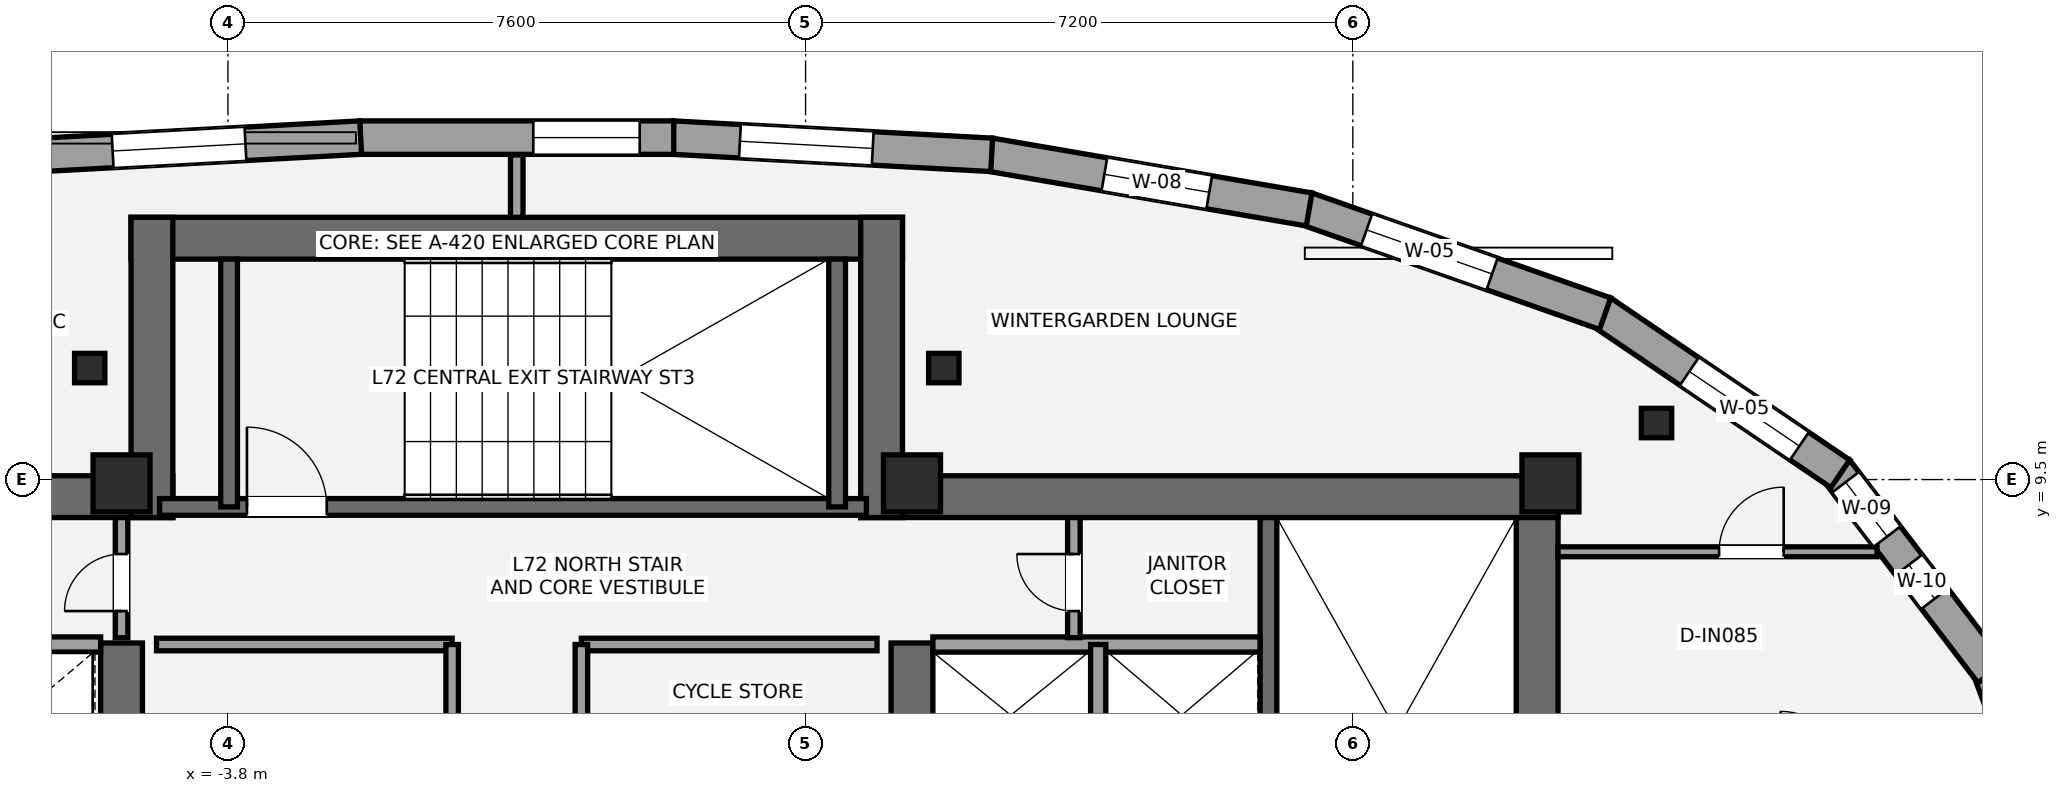
"""IFC4 building model, lengths in metres.
Left out: names, types, materials, properties, quantities, classifications, styles, units other than length and angle.
Written with IfcOpenShell. Run it as: python <this file> out.ifc"""

import sys

from ifc_helpers import new_model, si_unit, direction, frame, frame_2d, origin, origin_2d, place, context, subcontext, project, spatial, rectangle, i_section, extrude, element, fill, save


model = new_model("IFC4")
c1 = context("Model", 3, precision=1e-05, world=origin(), true_north=direction((0.0, 1.0)))
c2 = subcontext(c1, "Body", "Model", "MODEL_VIEW")
j1 = project(units=[si_unit("LENGTHUNIT", "METRE"), si_unit("PLANEANGLEUNIT", "RADIAN")], contexts=[c1])
p1 = place(None, origin())
s1 = spatial("IfcSite", under=j1, at=p1, CompositionType="ELEMENT")
p2 = place(p1, origin())
s2 = spatial("IfcBuilding", under=s1, at=p2, CompositionType="ELEMENT")
p3 = place(p2, frame((0.0, 0.0, 254.1)))
s3 = spatial("IfcBuildingStorey", under=s2, at=p3, CompositionType="ELEMENT", Elevation=254.1)
p4 = place(p3, frame((-13.7, 9.275, 0.0), z_axis=(0.0, 0.0, 1.0), x_axis=(1.0, 0.0, 0.0)))
e1 = element("IfcWall", 1, at=p4, inside=s3, PredefinedType="SHEAR", context=c2, shape_type="SweptSolid", body=[
    extrude(rectangle(XDim=9.175, YDim=0.55, at=frame_2d((4.587, 0.0))), origin(), (0.0, 0.0, 1.0), 3.15),
])
p5 = place(p3, frame((-5.2, 5.35, 0.0), z_axis=(0.0, 0.0, 1.0), x_axis=(0.0, 1.0, 0.0)))
e2 = element("IfcWall", 2, at=p5, inside=s3, PredefinedType="SHEAR", context=c2, shape_type="SweptSolid", body=[
    extrude(rectangle(XDim=2.0, YDim=0.55, at=frame_2d((1.0, 0.0))), origin(), (0.0, 0.0, 1.0), 3.15),
])
p6 = place(p3, frame((13.425, 1.3, 0.0), z_axis=(0.0, 0.0, 1.0), x_axis=(0.0, 1.0, 0.0)))
e3 = element("IfcWall", 3, at=p6, inside=s3, PredefinedType="SHEAR", context=c2, shape_type="SweptSolid", body=[
    extrude(rectangle(XDim=8.25, YDim=0.55, at=frame_2d((4.125, 0.0))), origin(), (0.0, 0.0, 1.0), 3.15),
])
p7 = place(p3, frame((4.525, 9.275, 0.0), z_axis=(0.0, 0.0, 1.0), x_axis=(1.0, 0.0, 0.0)))
e4 = element("IfcWall", 4, at=p7, inside=s3, PredefinedType="SHEAR", context=c2, shape_type="SweptSolid", body=[
    extrude(rectangle(XDim=9.175, YDim=0.55, at=frame_2d((4.587, 0.0))), origin(), (0.0, 0.0, 1.0), 3.15),
])
p8 = place(p3, frame((5.2, 5.35, 0.0), z_axis=(0.0, 0.0, 1.0), x_axis=(0.0, 1.0, 0.0)))
e5 = element("IfcWall", 5, at=p8, inside=s3, PredefinedType="SHEAR", context=c2, shape_type="SweptSolid", body=[
    extrude(rectangle(XDim=2.0, YDim=0.55, at=frame_2d((1.0, 0.0))), origin(), (0.0, 0.0, 1.0), 3.15),
])
p9 = place(p3, frame((9.89, 1.85, 0.0), z_axis=(0.0, 0.0, 1.0), x_axis=(0.0, 1.0, 0.0)))
e6 = element("IfcWall", 6, at=p9, inside=s3, PredefinedType="SHEAR", context=c2, shape_type="SweptSolid", body=[
    extrude(rectangle(XDim=7.15, YDim=0.22, at=frame_2d((3.575, 0.0))), origin(), (0.0, 0.0, 1.0), 3.15),
])
p10 = place(p3, frame((-5.075, 12.675, 0.0), z_axis=(0.0, 0.0, 1.0), x_axis=(1.0, 0.0, 0.0)))
e7 = element("IfcWall", 7, at=p10, inside=s3, PredefinedType="SHEAR", context=c2, shape_type="SweptSolid", body=[
    extrude(rectangle(XDim=10.15, YDim=0.55, at=frame_2d((5.075, 0.0))), origin(), (0.0, 0.0, 1.0), 3.15),
])
for number, where, z_axis, x_axis in (
    (8, (-4.8, 9.0, 0.0), (0.0, 0.0, 1.0), (0.0, 1.0, 0.0)),
    (9, (4.8, 9.0, 0.0), (0.0, 0.0, 1.0), (0.0, 1.0, 0.0)),
):
    element("IfcWall", number, at=place(p3, frame(where, z_axis=z_axis, x_axis=x_axis)), inside=s3, PredefinedType="SHEAR", context=c2, shape_type="SweptSolid", body=[
        extrude(rectangle(XDim=3.95, YDim=0.55, at=frame_2d((1.975, 0.0))), origin(), (0.0, 0.0, 1.0), 3.15),
    ])
p11 = place(p3, frame((-4.7, 9.14, 0.0), z_axis=(0.0, 0.0, 1.0), x_axis=(1.0, 0.0, 0.0)))
e10 = element("IfcWall", 10, at=p11, inside=s3, PredefinedType="SHEAR", context=c2, shape_type="SweptSolid", body=[
    extrude(rectangle(XDim=9.3, YDim=0.22, at=frame_2d((4.65, 0.0))), origin(), (0.0, 0.0, 1.0), 3.15),
])
p12 = place(p11, frame((1.15, 0.0, 0.0)))
e11 = element("IfcOpeningElement", 11, at=p12, cuts=e10, PredefinedType="OPENING", context=c2, shape_type="SweptSolid", body=[
    extrude(rectangle(XDim=1.05, YDim=2.15, at=frame_2d((0.525, 1.075))), frame((0.0, 0.12, 0.0), z_axis=(0.0, -1.0, 0.0), x_axis=(1.0, 0.0, 0.0)), (0.0, 0.0, 1.0), 0.24),
])
for number, where, z_axis, x_axis in (
    (12, (-3.785, 9.14, 0.0), (0.0, 0.0, 1.0), (0.0, 1.0, 0.0)),
    (13, (4.215, 9.14, 0.0), (0.0, 0.0, 1.0), (0.0, 1.0, 0.0)),
):
    element("IfcWall", number, at=place(p3, frame(where, z_axis=z_axis, x_axis=x_axis)), inside=s3, PredefinedType="SHEAR", context=c2, shape_type="SweptSolid", body=[
        extrude(rectangle(XDim=3.26, YDim=0.22, at=frame_2d((1.63, 0.0))), origin(), (0.0, 0.0, 1.0), 3.15),
    ])
for number, where, z_axis, x_axis in (
    (14, (-5.2, 9.45, 0.0), (0.0, 0.0, 1.0), (1.0, 0.0, 0.0)),
    (15, (5.2, 9.45, 0.0), (0.0, 0.0, 1.0), (1.0, 0.0, 0.0)),
    (16, (13.6, 9.45, 0.0), (0.0, 0.0, 1.0), (1.0, 0.0, 0.0)),
):
    element("IfcColumn", number, at=place(p3, frame(where, z_axis=z_axis, x_axis=x_axis)), inside=s3, PredefinedType="PILASTER", context=c2, shape_type="SweptSolid", body=[
        extrude(rectangle(XDim=0.75, YDim=0.75, at=origin_2d()), origin(), (0.0, 0.0, 1.0), 3.15),
    ])
for number, where, z_axis, x_axis in (
    (17, (14.996, 10.244, 0.0), (0.0, 0.0, 1.0), (1.0, 0.0, 0.0)),
    (18, (5.619, 10.967, 0.0), (0.0, 0.0, 1.0), (1.0, 0.0, 0.0)),
    (19, (-5.619, 10.967, 0.0), (0.0, 0.0, 1.0), (1.0, 0.0, 0.0)),
):
    element("IfcColumn", number, at=place(p3, frame(where, z_axis=z_axis, x_axis=x_axis)), inside=s3, PredefinedType="COLUMN", context=c2, shape_type="SweptSolid", body=[
        extrude(i_section(OverallWidth=0.399, OverallDepth=0.387, WebThickness=0.021, FlangeThickness=0.033, at=origin_2d()), origin(), (0.0, 0.0, 1.0), 3.15),
    ])
p13 = place(p3, frame((19.368, 7.017, 0.0), z_axis=(0.0, 0.0, 1.0), x_axis=(0.349627332297, -0.936888856007, 0.0)))
e20 = element("IfcWall", 20, at=p13, inside=s3, PredefinedType="STANDARD", context=c2, shape_type="SweptSolid", body=[
    extrude(rectangle(XDim=3.041, YDim=0.44, at=frame_2d((1.521, 0.0))), origin(), (0.0, 0.0, 1.0), 2.336),
])
p14 = place(p13, frame((1.742, 0.0, 0.58)))
e21 = element("IfcOpeningElement", 21, at=p14, cuts=e20, PredefinedType="OPENING", context=c2, shape_type="SweptSolid", body=[
    extrude(rectangle(XDim=0.9, YDim=1.35, at=frame_2d((0.45, 0.675))), frame((0.0, 0.23, 0.0), z_axis=(0.0, -1.0, 0.0), x_axis=(1.0, 0.0, 0.0)), (0.0, 0.0, 1.0), 0.46),
])
p15 = place(p3, frame((17.362, 9.625, 0.0), z_axis=(0.0, 0.0, 1.0), x_axis=(0.607266352304, -0.794498318034, 0.0)))
e22 = element("IfcWall", 22, at=p15, inside=s3, PredefinedType="STANDARD", context=c2, shape_type="SweptSolid", body=[
    extrude(rectangle(XDim=3.354, YDim=0.44, at=frame_2d((1.677, 0.0))), origin(), (0.0, 0.0, 1.0), 2.336),
])
p16 = place(p15, frame((0.2, 0.0, 0.58)))
e23 = element("IfcOpeningElement", 23, at=p16, cuts=e22, PredefinedType="OPENING", context=c2, shape_type="SweptSolid", body=[
    extrude(rectangle(XDim=0.9, YDim=1.35, at=frame_2d((0.45, 0.675))), frame((0.0, 0.23, 0.0), z_axis=(0.0, -1.0, 0.0), x_axis=(1.0, 0.0, 0.0)), (0.0, 0.0, 1.0), 0.46),
])
p17 = place(p15, frame((1.569, 0.0, 0.58)))
e24 = element("IfcOpeningElement", 24, at=p17, cuts=e22, PredefinedType="OPENING", context=c2, shape_type="SweptSolid", body=[
    extrude(rectangle(XDim=0.56, YDim=1.15, at=frame_2d((0.28, 0.575))), frame((0.0, 0.23, 0.0), z_axis=(0.0, -1.0, 0.0), x_axis=(1.0, 0.0, 0.0)), (0.0, 0.0, 1.0), 0.46),
])
p18 = place(p3, frame((14.269, 11.708, 0.0), z_axis=(0.0, 0.0, 1.0), x_axis=(0.827695346596, -0.561177702001, 0.0)))
e25 = element("IfcWall", 25, at=p18, inside=s3, PredefinedType="STANDARD", context=c2, shape_type="SweptSolid", body=[
    extrude(rectangle(XDim=3.8, YDim=0.44, at=frame_2d((1.9, 0.0))), origin(), (0.0, 0.0, 1.0), 2.336),
])
p19 = place(p18, frame((1.4, 0.0, 0.55)))
e26 = element("IfcOpeningElement", 26, at=p19, cuts=e25, PredefinedType="OPENING", context=c2, shape_type="SweptSolid", body=[
    extrude(rectangle(XDim=1.75, YDim=1.55, at=frame_2d((0.875, 0.775))), frame((0.0, 0.23, 0.0), z_axis=(0.0, -1.0, 0.0), x_axis=(1.0, 0.0, 0.0)), (0.0, 0.0, 1.0), 0.46),
])
p20 = place(p3, frame((10.389, 13.063, 0.0), z_axis=(0.0, 0.0, 1.0), x_axis=(0.943461130408, -0.331483175152, 0.0)))
e27 = element("IfcWall", 27, at=p20, inside=s3, PredefinedType="STANDARD", context=c2, shape_type="SweptSolid", body=[
    extrude(rectangle(XDim=4.166, YDim=0.44, at=frame_2d((2.083, 0.0))), origin(), (0.0, 0.0, 1.0), 2.336),
])
p21 = place(p20, frame((0.839, 0.0, 0.55)))
e28 = element("IfcOpeningElement", 28, at=p21, cuts=e27, PredefinedType="OPENING", context=c2, shape_type="SweptSolid", body=[
    extrude(rectangle(XDim=1.75, YDim=1.55, at=frame_2d((0.875, 0.775))), frame((0.0, 0.23, 0.0), z_axis=(0.0, -1.0, 0.0), x_axis=(1.0, 0.0, 0.0)), (0.0, 0.0, 1.0), 0.46),
])
p22 = place(p3, frame((6.223, 13.775, 0.0), z_axis=(0.0, 0.0, 1.0), x_axis=(0.985601268854, -0.169086187587, 0.0)))
e29 = element("IfcWall", 29, at=p22, inside=s3, PredefinedType="STANDARD", context=c2, shape_type="SweptSolid", body=[
    extrude(rectangle(XDim=4.264, YDim=0.44, at=frame_2d((2.132, 0.0))), origin(), (0.0, 0.0, 1.0), 2.336),
])
p23 = place(p22, frame((1.53, 0.0, 0.55)))
e30 = element("IfcOpeningElement", 30, at=p23, cuts=e29, PredefinedType="OPENING", context=c2, shape_type="SweptSolid", body=[
    extrude(rectangle(XDim=1.4, YDim=1.55, at=frame_2d((0.7, 0.775))), frame((0.0, 0.23, 0.0), z_axis=(0.0, -1.0, 0.0), x_axis=(1.0, 0.0, 0.0)), (0.0, 0.0, 1.0), 0.46),
])
p24 = place(p3, frame((2.054, 13.999, 0.0), z_axis=(0.0, 0.0, 1.0), x_axis=(0.998541341871, -0.05399248627, 0.0)))
e31 = element("IfcWall", 31, at=p24, inside=s3, PredefinedType="STANDARD", context=c2, shape_type="SweptSolid", body=[
    extrude(rectangle(XDim=4.201, YDim=0.44, at=frame_2d((2.1, 0.0))), origin(), (0.0, 0.0, 1.0), 2.336),
])
p25 = place(p24, frame((0.884, 0.0, 0.55)))
e32 = element("IfcOpeningElement", 32, at=p25, cuts=e31, PredefinedType="OPENING", context=c2, shape_type="SweptSolid", body=[
    extrude(rectangle(XDim=1.75, YDim=1.55, at=frame_2d((0.875, 0.775))), frame((0.0, 0.23, 0.0), z_axis=(0.0, -1.0, 0.0), x_axis=(1.0, 0.0, 0.0)), (0.0, 0.0, 1.0), 0.46),
])
p26 = place(p3, frame((-2.065, 13.999, 0.0), z_axis=(0.0, 0.0, 1.0), x_axis=(1.0, 0.0, 0.0)))
e33 = element("IfcWall", 33, at=p26, inside=s3, PredefinedType="STANDARD", context=c2, shape_type="SweptSolid", body=[
    extrude(rectangle(XDim=4.131, YDim=0.44, at=frame_2d((2.065, 0.0))), origin(), (0.0, 0.0, 1.0), 2.336),
])
p27 = place(p26, frame((2.283, 0.0, 0.58)))
e34 = element("IfcOpeningElement", 34, at=p27, cuts=e33, PredefinedType="OPENING", context=c2, shape_type="SweptSolid", body=[
    extrude(rectangle(XDim=1.4, YDim=1.55, at=frame_2d((0.7, 0.775))), frame((0.0, 0.23, 0.0), z_axis=(0.0, -1.0, 0.0), x_axis=(1.0, 0.0, 0.0)), (0.0, 0.0, 1.0), 0.46),
])
p28 = place(p3, frame((-6.248, 13.772, 0.0), z_axis=(0.0, 0.0, 1.0), x_axis=(0.998541341871, 0.05399248627, 0.0)))
e35 = element("IfcWall", 35, at=p28, inside=s3, PredefinedType="STANDARD", context=c2, shape_type="SweptSolid", body=[
    extrude(rectangle(XDim=4.201, YDim=0.44, at=frame_2d((2.1, 0.0))), origin(), (0.0, 0.0, 1.0), 2.336),
])
p29 = place(p28, frame((0.932, 0.0, 0.55)))
e36 = element("IfcOpeningElement", 36, at=p29, cuts=e35, PredefinedType="OPENING", context=c2, shape_type="SweptSolid", body=[
    extrude(rectangle(XDim=1.75, YDim=1.55, at=frame_2d((0.875, 0.775))), frame((0.0, 0.23, 0.0), z_axis=(0.0, -1.0, 0.0), x_axis=(1.0, 0.0, 0.0)), (0.0, 0.0, 1.0), 0.46),
])
for number, where, z_axis, x_axis in (
    (37, (-9.78, 7.33, 0.0), (0.0, 0.0, 1.0), (1.0, 0.0, 0.0)),
    (38, (5.475, 7.33, 0.0), (0.0, 0.0, 1.0), (1.0, 0.0, 0.0)),
):
    element("IfcWall", number, at=place(p3, frame(where, z_axis=z_axis, x_axis=x_axis)), inside=s3, PredefinedType="SOLIDWALL", context=c2, shape_type="SweptSolid", body=[
        extrude(rectangle(XDim=4.305, YDim=0.2, at=frame_2d((2.152, 0.0))), origin(), (0.0, 0.0, 1.0), 2.97),
    ])
p30 = place(p3, frame((7.65, 5.47, 0.0), z_axis=(0.0, 0.0, 1.0), x_axis=(0.0, 1.0, 0.0)))
e39 = element("IfcWall", 39, at=p30, inside=s3, PredefinedType="SOLIDWALL", context=c2, shape_type="SweptSolid", body=[
    extrude(rectangle(XDim=1.86, YDim=0.2, at=frame_2d((0.93, 0.0))), origin(), (0.0, 0.0, 1.0), 2.97),
])
p31 = place(p3, frame((-4.74, 7.33, 0.0), z_axis=(0.0, 0.0, 1.0), x_axis=(1.0, 0.0, 0.0)))
e40 = element("IfcWall", 40, at=p31, inside=s3, PredefinedType="PARTITIONING", context=c2, shape_type="SweptSolid", body=[
    extrude(rectangle(XDim=3.89, YDim=0.165, at=frame_2d((1.945, 0.0))), origin(), (0.0, 0.0, 1.0), 2.97),
])
p32 = place(p3, frame((-0.85, 5.52, 0.0), z_axis=(0.0, 0.0, 1.0), x_axis=(0.0, 1.0, 0.0)))
e41 = element("IfcWall", 41, at=p32, inside=s3, PredefinedType="PARTITIONING", context=c2, shape_type="SweptSolid", body=[
    extrude(rectangle(XDim=1.81, YDim=0.165, at=frame_2d((0.905, 0.0))), origin(), (0.0, 0.0, 1.0), 2.97),
])
p33 = place(p3, frame((0.85, 7.33, 0.0), z_axis=(0.0, 0.0, 1.0), x_axis=(1.0, 0.0, 0.0)))
e42 = element("IfcWall", 42, at=p33, inside=s3, PredefinedType="PARTITIONING", context=c2, shape_type="SweptSolid", body=[
    extrude(rectangle(XDim=3.89, YDim=0.165, at=frame_2d((1.945, 0.0))), origin(), (0.0, 0.0, 1.0), 2.97),
])
p34 = place(p3, frame((0.85, 5.52, 0.0), z_axis=(0.0, 0.0, 1.0), x_axis=(0.0, 1.0, 0.0)))
e43 = element("IfcWall", 43, at=p34, inside=s3, PredefinedType="PARTITIONING", context=c2, shape_type="SweptSolid", body=[
    extrude(rectangle(XDim=1.81, YDim=0.165, at=frame_2d((0.905, 0.0))), origin(), (0.0, 0.0, 1.0), 2.97),
])
p35 = place(p3, frame((-5.2, 7.42, 0.0), z_axis=(0.0, 0.0, 1.0), x_axis=(0.0, 1.0, 0.0)))
e44 = element("IfcWall", 44, at=p35, inside=s3, PredefinedType="PARTITIONING", context=c2, shape_type="SweptSolid", body=[
    extrude(rectangle(XDim=1.58, YDim=0.165, at=frame_2d((0.79, 0.0))), origin(), (0.0, 0.0, 1.0), 2.97),
])
p36 = place(p35, frame((0.35, 0.0, 0.0)))
e45 = element("IfcOpeningElement", 45, at=p36, cuts=e44, PredefinedType="OPENING", context=c2, shape_type="SweptSolid", body=[
    extrude(rectangle(XDim=0.75, YDim=2.1, at=frame_2d((0.375, 1.05))), frame((0.0, 0.093, 0.0), z_axis=(0.0, -1.0, 0.0), x_axis=(1.0, 0.0, 0.0)), (0.0, 0.0, 1.0), 0.185),
])
p37 = place(p3, frame((7.33, 7.42, 0.0), z_axis=(0.0, 0.0, 1.0), x_axis=(0.0, 1.0, 0.0)))
e46 = element("IfcWall", 46, at=p37, inside=s3, PredefinedType="PARTITIONING", context=c2, shape_type="SweptSolid", body=[
    extrude(rectangle(XDim=1.58, YDim=0.165, at=frame_2d((0.79, 0.0))), origin(), (0.0, 0.0, 1.0), 2.97),
])
p38 = place(p37, frame((0.35, 0.0, 0.0)))
e47 = element("IfcOpeningElement", 47, at=p38, cuts=e46, PredefinedType="OPENING", context=c2, shape_type="SweptSolid", body=[
    extrude(rectangle(XDim=0.75, YDim=2.1, at=frame_2d((0.375, 1.05))), frame((0.0, 0.093, 0.0), z_axis=(0.0, -1.0, 0.0), x_axis=(1.0, 0.0, 0.0)), (0.0, 0.0, 1.0), 0.185),
])
p39 = place(p3, frame((0.0, 12.95, 0.0), z_axis=(0.0, 0.0, 1.0), x_axis=(0.0, 1.0, 0.0)))
e48 = element("IfcWall", 48, at=p39, inside=s3, PredefinedType="PARTITIONING", context=c2, shape_type="SweptSolid", body=[
    extrude(rectangle(XDim=0.821, YDim=0.165, at=frame_2d((0.41, 0.0))), origin(), (0.0, 0.0, 1.0), 2.97),
])
p40 = place(p3, frame((13.7, 8.55, 0.0), z_axis=(0.0, 0.0, 1.0), x_axis=(1.0, 0.0, 0.0)))
e49 = element("IfcWall", 49, at=p40, inside=s3, PredefinedType="PARTITIONING", context=c2, shape_type="SweptSolid", body=[
    extrude(rectangle(XDim=4.197, YDim=0.13, at=frame_2d((2.098, 0.0))), origin(), (0.0, 0.0, 1.0), 2.423),
])
p41 = place(p40, frame((2.119, 0.0, 0.0)))
e50 = element("IfcOpeningElement", 50, at=p41, cuts=e49, PredefinedType="OPENING", context=c2, shape_type="SweptSolid", body=[
    extrude(rectangle(XDim=0.85, YDim=2.1, at=frame_2d((0.425, 1.05))), frame((0.0, 0.075, 0.0), z_axis=(0.0, -1.0, 0.0), x_axis=(1.0, 0.0, 0.0)), (0.0, 0.0, 1.0), 0.15),
])
p42 = place(p16, origin())
e51 = element("IfcWindow", 51, at=p42, inside=s3, PartitioningType="SINGLE_PANEL", PredefinedType="WINDOW", context=c2, shape_type="SweptSolid", body=[
    extrude(rectangle(XDim=0.9, YDim=1.35, at=frame_2d((0.45, 0.675))), frame((0.0, -0.01, 0.0), z_axis=(0.0, -1.0, 0.0), x_axis=(1.0, 0.0, 0.0)), (0.0, 0.0, 1.0), 0.06),
])
fill(e23, e51)
p43 = place(p19, origin())
e52 = element("IfcWindow", 52, at=p43, inside=s3, PartitioningType="SINGLE_PANEL", PredefinedType="WINDOW", context=c2, shape_type="SweptSolid", body=[
    extrude(rectangle(XDim=1.75, YDim=1.55, at=frame_2d((0.875, 0.775))), frame((0.0, -0.01, 0.0), z_axis=(0.0, -1.0, 0.0), x_axis=(1.0, 0.0, 0.0)), (0.0, 0.0, 1.0), 0.06),
])
fill(e26, e52)
p44 = place(p21, origin())
e53 = element("IfcWindow", 53, at=p44, inside=s3, PartitioningType="SINGLE_PANEL", PredefinedType="WINDOW", context=c2, shape_type="SweptSolid", body=[
    extrude(rectangle(XDim=1.75, YDim=1.55, at=frame_2d((0.875, 0.775))), frame((0.0, -0.01, 0.0), z_axis=(0.0, -1.0, 0.0), x_axis=(1.0, 0.0, 0.0)), (0.0, 0.0, 1.0), 0.06),
])
fill(e28, e53)
p45 = place(p23, origin())
e54 = element("IfcWindow", 54, at=p45, inside=s3, PartitioningType="SINGLE_PANEL", PredefinedType="WINDOW", context=c2, shape_type="SweptSolid", body=[
    extrude(rectangle(XDim=1.4, YDim=1.55, at=frame_2d((0.7, 0.775))), frame((0.0, -0.01, 0.0), z_axis=(0.0, -1.0, 0.0), x_axis=(1.0, 0.0, 0.0)), (0.0, 0.0, 1.0), 0.06),
])
fill(e30, e54)
p46 = place(p25, origin())
e55 = element("IfcWindow", 55, at=p46, inside=s3, PartitioningType="SINGLE_PANEL", PredefinedType="WINDOW", context=c2, shape_type="SweptSolid", body=[
    extrude(rectangle(XDim=1.75, YDim=1.55, at=frame_2d((0.875, 0.775))), frame((0.0, -0.01, 0.0), z_axis=(0.0, -1.0, 0.0), x_axis=(1.0, 0.0, 0.0)), (0.0, 0.0, 1.0), 0.06),
])
fill(e32, e55)
p47 = place(p27, origin())
e56 = element("IfcWindow", 56, at=p47, inside=s3, PartitioningType="SINGLE_PANEL", PredefinedType="WINDOW", context=c2, shape_type="SweptSolid", body=[
    extrude(rectangle(XDim=1.4, YDim=1.55, at=frame_2d((0.7, 0.775))), frame((0.0, -0.01, 0.0), z_axis=(0.0, -1.0, 0.0), x_axis=(1.0, 0.0, 0.0)), (0.0, 0.0, 1.0), 0.06),
])
fill(e34, e56)
p48 = place(p29, origin())
e57 = element("IfcWindow", 57, at=p48, inside=s3, PartitioningType="SINGLE_PANEL", PredefinedType="WINDOW", context=c2, shape_type="SweptSolid", body=[
    extrude(rectangle(XDim=1.75, YDim=1.55, at=frame_2d((0.875, 0.775))), frame((0.0, -0.01, 0.0), z_axis=(0.0, -1.0, 0.0), x_axis=(1.0, 0.0, 0.0)), (0.0, 0.0, 1.0), 0.06),
])
fill(e36, e57)
p49 = place(p17, origin())
e58 = element("IfcWindow", 58, at=p49, inside=s3, PartitioningType="SINGLE_PANEL", PredefinedType="WINDOW", context=c2, shape_type="SweptSolid", body=[
    extrude(rectangle(XDim=0.56, YDim=1.15, at=frame_2d((0.28, 0.575))), frame((0.0, -0.01, 0.0), z_axis=(0.0, -1.0, 0.0), x_axis=(1.0, 0.0, 0.0)), (0.0, 0.0, 1.0), 0.06),
])
fill(e24, e58)
p50 = place(p12, origin())
e59 = element("IfcDoor", 59, at=p50, inside=s3, OperationType="SINGLE_SWING_LEFT", PredefinedType="DOOR", context=c2, shape_type="SweptSolid", body=[
    extrude(rectangle(XDim=1.05, YDim=2.15, at=frame_2d((0.525, 1.075))), frame((0.0, 0.025, 0.0), z_axis=(0.0, -1.0, 0.0), x_axis=(1.0, 0.0, 0.0)), (0.0, 0.0, 1.0), 0.05),
])
fill(e11, e59)
p51 = place(p36, origin())
e60 = element("IfcDoor", 60, at=p51, inside=s3, OperationType="SINGLE_SWING_LEFT", PredefinedType="DOOR", context=c2, shape_type="SweptSolid", body=[
    extrude(rectangle(XDim=0.75, YDim=2.1, at=frame_2d((0.375, 1.05))), frame((0.0, 0.025, 0.0), z_axis=(0.0, -1.0, 0.0), x_axis=(1.0, 0.0, 0.0)), (0.0, 0.0, 1.0), 0.05),
])
fill(e45, e60)
p52 = place(p38, origin())
e61 = element("IfcDoor", 61, at=p52, inside=s3, OperationType="SINGLE_SWING_RIGHT", PredefinedType="DOOR", context=c2, shape_type="SweptSolid", body=[
    extrude(rectangle(XDim=0.75, YDim=2.1, at=frame_2d((0.375, 1.05))), frame((0.0, 0.025, 0.0), z_axis=(0.0, -1.0, 0.0), x_axis=(1.0, 0.0, 0.0)), (0.0, 0.0, 1.0), 0.05),
])
fill(e47, e61)
p53 = place(p41, origin())
e62 = element("IfcDoor", 62, at=p53, inside=s3, OperationType="SINGLE_SWING_RIGHT", PredefinedType="DOOR", context=c2, shape_type="SweptSolid", body=[
    extrude(rectangle(XDim=0.85, YDim=2.1, at=frame_2d((0.425, 1.05))), frame((0.0, 0.025, 0.0), z_axis=(0.0, -1.0, 0.0), x_axis=(1.0, 0.0, 0.0)), (0.0, 0.0, 1.0), 0.05),
])
fill(e50, e62)
save(model, sys.argv[1])
